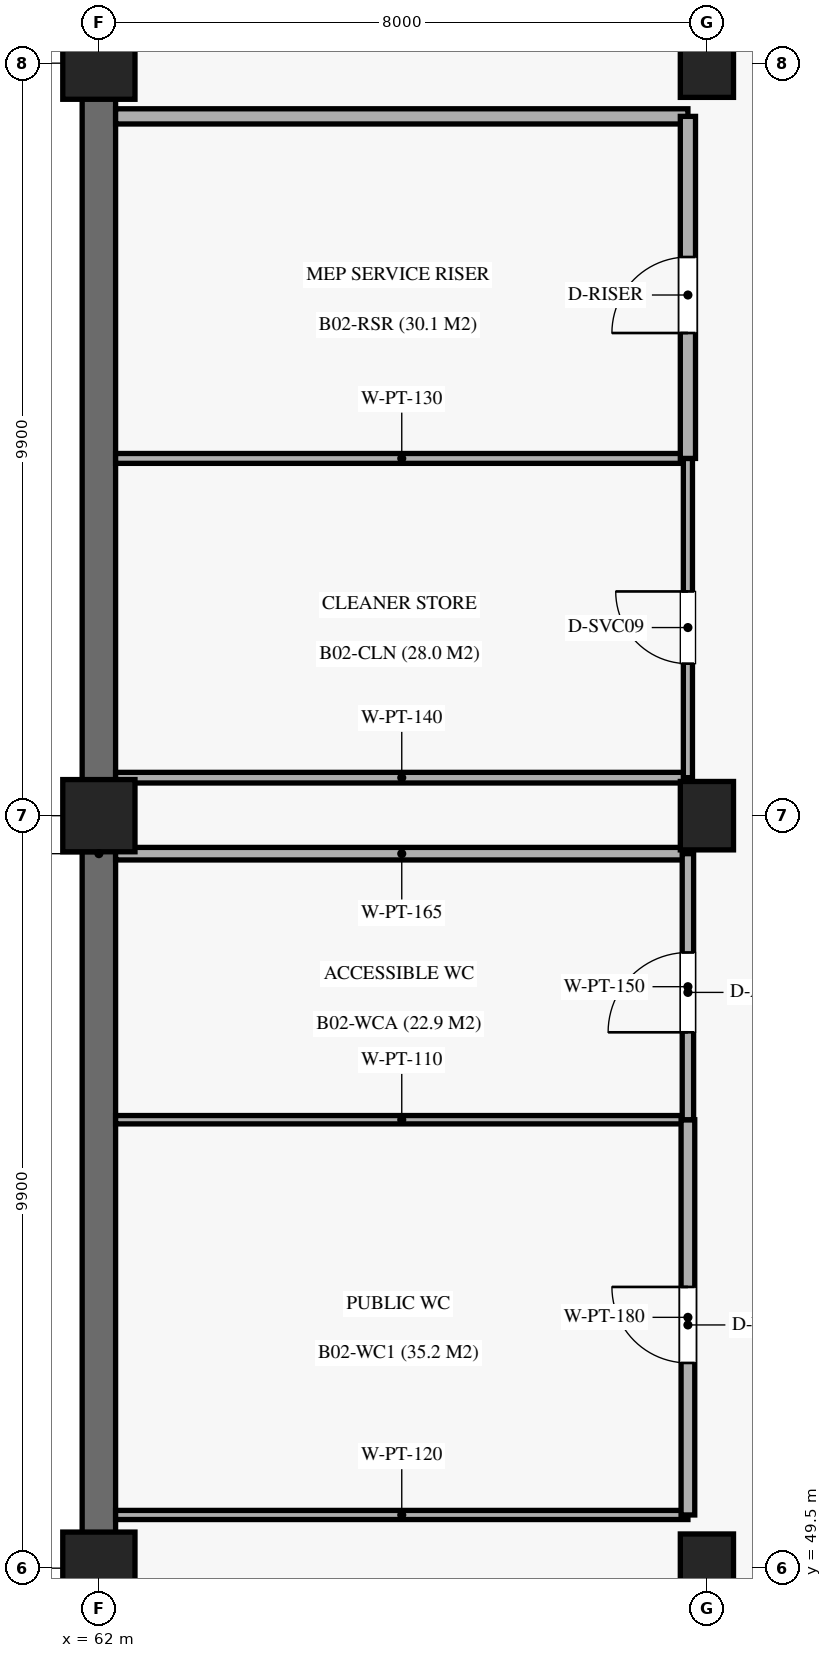
"""IFC4 building model, lengths in metres.
Left out: names, types, materials, properties, quantities, classifications, styles, units other than length and angle.
Written with IfcOpenShell. Run it as: python <this file> out.ifc"""

import sys

from ifc_helpers import new_model, si_unit, direction, frame, frame_2d, origin, origin_2d, place, context, subcontext, project, spatial, rectangle, extrude, element, fill, save


model = new_model("IFC4")
c1 = context("Model", 3, precision=1e-05, world=origin(), true_north=direction((0.0, 1.0)))
c2 = subcontext(c1, "Body", "Model", "MODEL_VIEW")
j1 = project(units=[si_unit("LENGTHUNIT", "METRE"), si_unit("PLANEANGLEUNIT", "RADIAN")], contexts=[c1])
p1 = place(None, origin())
s1 = spatial("IfcSite", under=j1, at=p1, CompositionType="ELEMENT")
p2 = place(p1, origin())
s2 = spatial("IfcBuilding", under=s1, at=p2, CompositionType="ELEMENT")
p3 = place(p2, frame((0.0, 0.0, -9.18)))
s3 = spatial("IfcBuildingStorey", under=s2, at=p3, CompositionType="ELEMENT", Elevation=-9.18)
for number, where, z_axis, x_axis in (
    (1, (62.0, 49.5, 0.0), (0.0, 0.0, 1.0), (1.0, 0.0, 0.0)),
    (2, (62.0, 59.4, 0.0), (0.0, 0.0, 1.0), (1.0, 0.0, 0.0)),
    (3, (62.0, 69.3, 0.0), (0.0, 0.0, 1.0), (1.0, 0.0, 0.0)),
):
    element("IfcColumn", number, at=place(p3, frame(where, z_axis=z_axis, x_axis=x_axis)), inside=s3, PredefinedType="COLUMN", context=c2, shape_type="SweptSolid", body=[
        extrude(rectangle(XDim=0.95, YDim=0.95, at=origin_2d()), origin(), (0.0, 0.0, 1.0), 4.59),
    ])
for number, where, z_axis, x_axis in (
    (4, (70.0, 49.5, 0.0), (0.0, 0.0, 1.0), (1.0, 0.0, 0.0)),
    (5, (70.0, 59.4, 0.0), (0.0, 0.0, 1.0), (1.0, 0.0, 0.0)),
    (6, (70.0, 69.3, 0.0), (0.0, 0.0, 1.0), (1.0, 0.0, 0.0)),
):
    element("IfcColumn", number, at=place(p3, frame(where, z_axis=z_axis, x_axis=x_axis)), inside=s3, PredefinedType="COLUMN", context=c2, shape_type="SweptSolid", body=[
        extrude(rectangle(XDim=0.7, YDim=0.9, at=origin_2d()), origin(), (0.0, 0.0, 1.0), 4.59),
    ])
p4 = place(p3, frame((62.0, 79.2, 0.0), z_axis=(0.0, 0.0, 1.0), x_axis=(0.0, -1.0, 0.0)))
e7 = element("IfcWall", 7, at=p4, inside=s3, PredefinedType="USERDEFINED", context=c2, shape_type="SweptSolid", body=[
    extrude(rectangle(XDim=79.2, YDim=0.44, at=frame_2d((39.6, 0.0))), origin(), (0.0, 0.0, 1.0), 3.66),
])
p5 = place(p3, frame((62.22, 50.2, 0.0), z_axis=(0.0, 0.0, 1.0), x_axis=(1.0, 0.0, 0.0)))
e8 = element("IfcWall", 8, at=p5, inside=s3, PredefinedType="PARTITIONING", context=c2, shape_type="SweptSolid", body=[
    extrude(rectangle(XDim=7.53, YDim=0.12, at=frame_2d((3.765, 0.0))), origin(), (0.0, 0.0, 1.0), 3.43),
])
p6 = place(p3, frame((62.22, 55.4, 0.0), z_axis=(0.0, 0.0, 1.0), x_axis=(1.0, 0.0, 0.0)))
e9 = element("IfcWall", 9, at=p6, inside=s3, PredefinedType="PARTITIONING", context=c2, shape_type="SweptSolid", body=[
    extrude(rectangle(XDim=7.53, YDim=0.11, at=frame_2d((3.765, 0.0))), origin(), (0.0, 0.0, 1.0), 3.43),
])
p7 = place(p3, frame((69.75, 50.2, 0.0), z_axis=(0.0, 0.0, 1.0), x_axis=(0.0, 1.0, 0.0)))
e10 = element("IfcWall", 10, at=p7, inside=s3, PredefinedType="PARTITIONING", context=c2, shape_type="SweptSolid", body=[
    extrude(rectangle(XDim=5.2, YDim=0.18, at=frame_2d((2.6, 0.0))), origin(), (0.0, 0.0, 1.0), 3.43),
])
p8 = place(p7, frame((2.0, 0.0, 0.0)))
e11 = element("IfcOpeningElement", 11, at=p8, cuts=e10, PredefinedType="OPENING", context=c2, shape_type="SweptSolid", body=[
    extrude(rectangle(XDim=1.0, YDim=2.1, at=frame_2d((0.5, 1.05))), frame((0.0, 0.1, 0.0), z_axis=(0.0, -1.0, 0.0), x_axis=(1.0, 0.0, 0.0)), (0.0, 0.0, 1.0), 0.2),
])
p9 = place(p3, frame((62.22, 58.9, 0.0), z_axis=(0.0, 0.0, 1.0), x_axis=(1.0, 0.0, 0.0)))
e12 = element("IfcWall", 12, at=p9, inside=s3, PredefinedType="PARTITIONING", context=c2, shape_type="SweptSolid", body=[
    extrude(rectangle(XDim=7.53, YDim=0.165, at=frame_2d((3.765, 0.0))), origin(), (0.0, 0.0, 1.0), 3.43),
])
p10 = place(p3, frame((69.75, 55.4, 0.0), z_axis=(0.0, 0.0, 1.0), x_axis=(0.0, 1.0, 0.0)))
e13 = element("IfcWall", 13, at=p10, inside=s3, PredefinedType="PARTITIONING", context=c2, shape_type="SweptSolid", body=[
    extrude(rectangle(XDim=3.5, YDim=0.15, at=frame_2d((1.75, 0.0))), origin(), (0.0, 0.0, 1.0), 3.43),
])
p11 = place(p10, frame((1.15, 0.0, 0.0)))
e14 = element("IfcOpeningElement", 14, at=p11, cuts=e13, PredefinedType="OPENING", context=c2, shape_type="SweptSolid", body=[
    extrude(rectangle(XDim=1.05, YDim=2.15, at=frame_2d((0.525, 1.075))), frame((0.0, 0.085, 0.0), z_axis=(0.0, -1.0, 0.0), x_axis=(1.0, 0.0, 0.0)), (0.0, 0.0, 1.0), 0.17),
])
p12 = place(p3, frame((62.22, 59.9, 0.0), z_axis=(0.0, 0.0, 1.0), x_axis=(1.0, 0.0, 0.0)))
e15 = element("IfcWall", 15, at=p12, inside=s3, PredefinedType="PARTITIONING", context=c2, shape_type="SweptSolid", body=[
    extrude(rectangle(XDim=7.53, YDim=0.14, at=frame_2d((3.765, 0.0))), origin(), (0.0, 0.0, 1.0), 3.43),
])
p13 = place(p3, frame((62.22, 64.1, 0.0), z_axis=(0.0, 0.0, 1.0), x_axis=(1.0, 0.0, 0.0)))
e16 = element("IfcWall", 16, at=p13, inside=s3, PredefinedType="PARTITIONING", context=c2, shape_type="SweptSolid", body=[
    extrude(rectangle(XDim=7.53, YDim=0.13, at=frame_2d((3.765, 0.0))), origin(), (0.0, 0.0, 1.0), 3.43),
])
p14 = place(p3, frame((69.75, 59.9, 0.0), z_axis=(0.0, 0.0, 1.0), x_axis=(0.0, 1.0, 0.0)))
e17 = element("IfcWall", 17, at=p14, inside=s3, PredefinedType="PARTITIONING", context=c2, shape_type="SweptSolid", body=[
    extrude(rectangle(XDim=4.2, YDim=0.12, at=frame_2d((2.1, 0.0))), origin(), (0.0, 0.0, 1.0), 3.43),
])
p15 = place(p14, frame((1.5, 0.0, 0.0)))
e18 = element("IfcOpeningElement", 18, at=p15, cuts=e17, PredefinedType="OPENING", context=c2, shape_type="SweptSolid", body=[
    extrude(rectangle(XDim=0.95, YDim=2.1, at=frame_2d((0.475, 1.05))), frame((0.0, 0.07, 0.0), z_axis=(0.0, -1.0, 0.0), x_axis=(1.0, 0.0, 0.0)), (0.0, 0.0, 1.0), 0.14),
])
p16 = place(p3, frame((62.22, 68.6, 0.0), z_axis=(0.0, 0.0, 1.0), x_axis=(1.0, 0.0, 0.0)))
e19 = element("IfcWall", 19, at=p16, inside=s3, PredefinedType="SOLIDWALL", context=c2, shape_type="SweptSolid", body=[
    extrude(rectangle(XDim=7.53, YDim=0.2, at=frame_2d((3.765, 0.0))), origin(), (0.0, 0.0, 1.0), 3.43),
])
p17 = place(p3, frame((69.75, 64.1, 0.0), z_axis=(0.0, 0.0, 1.0), x_axis=(0.0, 1.0, 0.0)))
e20 = element("IfcWall", 20, at=p17, inside=s3, PredefinedType="SOLIDWALL", context=c2, shape_type="SweptSolid", body=[
    extrude(rectangle(XDim=4.5, YDim=0.2, at=frame_2d((2.25, 0.0))), origin(), (0.0, 0.0, 1.0), 3.43),
])
p18 = place(p17, frame((1.65, 0.0, 0.0)))
e21 = element("IfcOpeningElement", 21, at=p18, cuts=e20, PredefinedType="OPENING", context=c2, shape_type="SweptSolid", body=[
    extrude(rectangle(XDim=1.0, YDim=2.15, at=frame_2d((0.5, 1.075))), frame((0.0, 0.11, 0.0), z_axis=(0.0, -1.0, 0.0), x_axis=(1.0, 0.0, 0.0)), (0.0, 0.0, 1.0), 0.22),
])
p19 = place(p8, origin())
e22 = element("IfcDoor", 22, at=p19, inside=s3, OperationType="SINGLE_SWING_RIGHT", PredefinedType="DOOR", context=c2, shape_type="SweptSolid", body=[
    extrude(rectangle(XDim=1.0, YDim=2.1, at=frame_2d((0.5, 1.05))), frame((0.0, 0.025, 0.0), z_axis=(0.0, -1.0, 0.0), x_axis=(1.0, 0.0, 0.0)), (0.0, 0.0, 1.0), 0.05),
])
fill(e11, e22)
p20 = place(p11, origin())
e23 = element("IfcDoor", 23, at=p20, inside=s3, OperationType="SINGLE_SWING_LEFT", PredefinedType="DOOR", context=c2, shape_type="SweptSolid", body=[
    extrude(rectangle(XDim=1.05, YDim=2.15, at=frame_2d((0.525, 1.075))), frame((0.0, 0.025, 0.0), z_axis=(0.0, -1.0, 0.0), x_axis=(1.0, 0.0, 0.0)), (0.0, 0.0, 1.0), 0.05),
])
fill(e14, e23)
p21 = place(p15, origin())
e24 = element("IfcDoor", 24, at=p21, inside=s3, OperationType="SINGLE_SWING_RIGHT", PredefinedType="DOOR", context=c2, shape_type="SweptSolid", body=[
    extrude(rectangle(XDim=0.95, YDim=2.1, at=frame_2d((0.475, 1.05))), frame((0.0, 0.025, 0.0), z_axis=(0.0, -1.0, 0.0), x_axis=(1.0, 0.0, 0.0)), (0.0, 0.0, 1.0), 0.05),
])
fill(e18, e24)
p22 = place(p18, origin())
e25 = element("IfcDoor", 25, at=p22, inside=s3, OperationType="SINGLE_SWING_LEFT", PredefinedType="DOOR", context=c2, shape_type="SweptSolid", body=[
    extrude(rectangle(XDim=1.0, YDim=2.15, at=frame_2d((0.5, 1.075))), frame((0.0, 0.025, 0.0), z_axis=(0.0, -1.0, 0.0), x_axis=(1.0, 0.0, 0.0)), (0.0, 0.0, 1.0), 0.05),
])
fill(e21, e25)
save(model, sys.argv[1])
